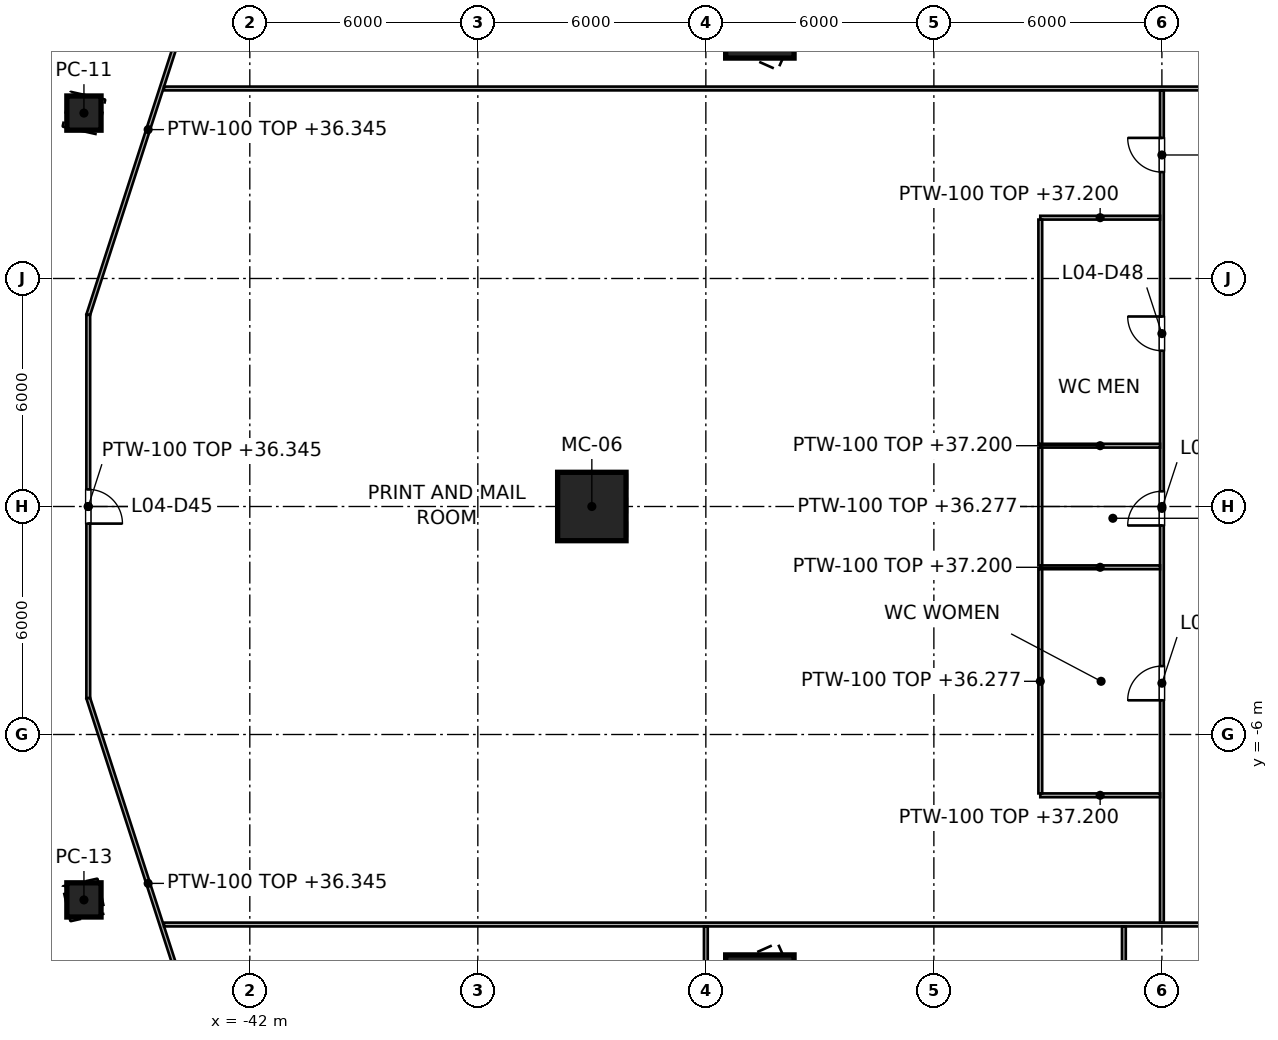
"""IFC4 building model, lengths in metres.
Left out: names, types, materials, properties, quantities, classifications, styles, units other than length and angle.
Written with IfcOpenShell. Run it as: python <this file> out.ifc"""

import sys

from ifc_helpers import new_model, si_unit, direction, frame, frame_2d, origin, origin_2d, place, context, subcontext, project, spatial, rectangle, hollow_rectangle, extrude, element, fill, save


model = new_model("IFC4")
c1 = context("Model", 3, precision=1e-05, world=origin(), true_north=direction((0.0, 1.0)))
c2 = subcontext(c1, "Body", "Model", "MODEL_VIEW")
j1 = project(units=[si_unit("LENGTHUNIT", "METRE"), si_unit("PLANEANGLEUNIT", "RADIAN")], contexts=[c1])
p1 = place(None, origin())
s1 = spatial("IfcSite", under=j1, at=p1, CompositionType="ELEMENT")
p2 = place(p1, origin())
s2 = spatial("IfcBuilding", under=s1, at=p2, CompositionType="ELEMENT")
p3 = place(p2, frame((0.0, 0.0, 31.4)))
s3 = spatial("IfcBuildingStorey", under=s2, at=p3, CompositionType="ELEMENT", Elevation=31.4)
for number, where, z_axis, x_axis in (
    (1, (-28.579, 12.7, 0.0), (0.0, 0.0, 1.0), (-0.914, 0.406, 0.0)),
    (2, (-33.0, 0.0, 0.0), (0.0, 0.0, 1.0), (-1.0, 0.0, 0.0)),
    (3, (-28.579, -12.7, 0.0), (0.0, 0.0, 1.0), (-0.914, -0.406, 0.0)),
):
    element("IfcColumn", number, at=place(p3, frame(where, z_axis=z_axis, x_axis=x_axis)), inside=s3, PredefinedType="COLUMN", context=c2, shape_type="SweptSolid", body=[
        extrude(hollow_rectangle(XDim=1.8, YDim=1.8, WallThickness=0.08, at=origin_2d()), origin(), (0.0, 0.0, 1.0), 6.0),
    ])
for number, where, z_axis, x_axis in (
    (4, (-46.365, 10.353, 0.0), (0.0, 0.0, 1.0), (-0.976, 0.218, 0.0)),
    (5, (-46.365, -10.353, 0.0), (0.0, 0.0, 1.0), (-0.976, -0.218, 0.0)),
):
    element("IfcColumn", number, at=place(p3, frame(where, z_axis=z_axis, x_axis=x_axis)), inside=s3, PredefinedType="COLUMN", context=c2, shape_type="SweptSolid", body=[
        extrude(hollow_rectangle(XDim=0.9, YDim=0.9, WallThickness=0.04, at=origin_2d()), origin(), (0.0, 0.0, 1.0), 6.0),
    ])
p4 = place(p3, frame((-43.099, 14.791, 0.0), z_axis=(0.0, 0.0, 1.0), x_axis=(-0.307713034182, -0.951479210805, 0.0)))
e6 = element("IfcWall", 6, at=p4, inside=s3, PredefinedType="PARTITIONING", context=c2, shape_type="SweptSolid", body=[
    extrude(rectangle(XDim=10.243, YDim=0.1, at=frame_2d((5.122, 0.0))), origin(), (0.0, 0.0, 1.0), 4.945),
])
p5 = place(p3, frame((-46.251, 5.045, 0.0), z_axis=(0.0, 0.0, 1.0), x_axis=(0.0, -1.0, 0.0)))
e7 = element("IfcWall", 7, at=p5, inside=s3, PredefinedType="PARTITIONING", context=c2, shape_type="SweptSolid", body=[
    extrude(rectangle(XDim=10.09, YDim=0.1, at=frame_2d((5.045, 0.0))), origin(), (0.0, 0.0, 1.0), 4.945),
])
p6 = place(p5, frame((4.595, 0.0, 0.0)))
e8 = element("IfcOpeningElement", 8, at=p6, cuts=e7, PredefinedType="OPENING", context=c2, shape_type="SweptSolid", body=[
    extrude(rectangle(XDim=0.9, YDim=2.1, at=frame_2d((0.45, 1.05))), frame((0.0, 0.05, 0.0), z_axis=(0.0, -1.0, 0.0), x_axis=(1.0, 0.0, 0.0)), (0.0, 0.0, 1.0), 0.1),
])
p7 = place(p3, frame((-46.251, -5.045, 0.0), z_axis=(0.0, 0.0, 1.0), x_axis=(0.307713034182, -0.951479210805, 0.0)))
e9 = element("IfcWall", 9, at=p7, inside=s3, PredefinedType="PARTITIONING", context=c2, shape_type="SweptSolid", body=[
    extrude(rectangle(XDim=10.243, YDim=0.1, at=frame_2d((5.122, 0.0))), origin(), (0.0, 0.0, 1.0), 4.945),
])
p8 = place(p3, frame((-44.256, 11.0, 0.0), z_axis=(0.0, 0.0, 1.0), x_axis=(1.0, 0.0, 0.0)))
e10 = element("IfcWall", 10, at=p8, inside=s3, PredefinedType="PARTITIONING", context=c2, shape_type="SweptSolid", body=[
    extrude(rectangle(XDim=88.512, YDim=0.1, at=frame_2d((44.256, 0.0))), origin(), (0.0, 0.0, 1.0), 4.868),
])
p9 = place(p8, frame((54.2, 0.0, 0.0)))
e11 = element("IfcOpeningElement", 11, at=p9, cuts=e10, PredefinedType="OPENING", context=c2, shape_type="SweptSolid", body=[
    extrude(rectangle(XDim=1.4, YDim=2.1, at=frame_2d((0.7, 1.05))), frame((0.0, 0.05, 0.0), z_axis=(0.0, -1.0, 0.0), x_axis=(1.0, 0.0, 0.0)), (0.0, 0.0, 1.0), 0.1),
])
p10 = place(p8, frame((32.9, 0.0, 0.0)))
e12 = element("IfcOpeningElement", 12, at=p10, cuts=e10, PredefinedType="OPENING", context=c2, shape_type="SweptSolid", body=[
    extrude(rectangle(XDim=1.4, YDim=2.1, at=frame_2d((0.7, 1.05))), frame((0.0, 0.05, 0.0), z_axis=(0.0, -1.0, 0.0), x_axis=(1.0, 0.0, 0.0)), (0.0, 0.0, 1.0), 0.1),
])
p11 = place(p8, frame((43.35, 0.0, 0.0)))
e13 = element("IfcOpeningElement", 13, at=p11, cuts=e10, PredefinedType="OPENING", context=c2, shape_type="SweptSolid", body=[
    extrude(rectangle(XDim=1.8, YDim=2.1, at=frame_2d((0.9, 1.05))), frame((0.0, 0.05, 0.0), z_axis=(0.0, -1.0, 0.0), x_axis=(1.0, 0.0, 0.0)), (0.0, 0.0, 1.0), 0.1),
])
p12 = place(p3, frame((-44.256, -11.0, 0.0), z_axis=(0.0, 0.0, 1.0), x_axis=(1.0, 0.0, 0.0)))
e14 = element("IfcWall", 14, at=p12, inside=s3, PredefinedType="PARTITIONING", context=c2, shape_type="SweptSolid", body=[
    extrude(rectangle(XDim=88.512, YDim=0.1, at=frame_2d((44.256, 0.0))), origin(), (0.0, 0.0, 1.0), 4.868),
])
p13 = place(p12, frame((32.9, 0.0, 0.0)))
e15 = element("IfcOpeningElement", 15, at=p13, cuts=e14, PredefinedType="OPENING", context=c2, shape_type="SweptSolid", body=[
    extrude(rectangle(XDim=1.4, YDim=2.1, at=frame_2d((0.7, 1.05))), frame((0.0, 0.05, 0.0), z_axis=(0.0, -1.0, 0.0), x_axis=(1.0, 0.0, 0.0)), (0.0, 0.0, 1.0), 0.1),
])
p14 = place(p12, frame((54.2, 0.0, 0.0)))
e16 = element("IfcOpeningElement", 16, at=p14, cuts=e14, PredefinedType="OPENING", context=c2, shape_type="SweptSolid", body=[
    extrude(rectangle(XDim=1.4, YDim=2.1, at=frame_2d((0.7, 1.05))), frame((0.0, 0.05, 0.0), z_axis=(0.0, -1.0, 0.0), x_axis=(1.0, 0.0, 0.0)), (0.0, 0.0, 1.0), 0.1),
])
p15 = place(p12, frame((38.65, 0.0, 0.0)))
e17 = element("IfcOpeningElement", 17, at=p15, cuts=e14, PredefinedType="OPENING", context=c2, shape_type="SweptSolid", body=[
    extrude(rectangle(XDim=1.8, YDim=2.1, at=frame_2d((0.9, 1.05))), frame((0.0, 0.05, 0.0), z_axis=(0.0, -1.0, 0.0), x_axis=(1.0, 0.0, 0.0)), (0.0, 0.0, 1.0), 0.1),
])
p16 = place(p12, frame((48.1, 0.0, 0.0)))
e18 = element("IfcOpeningElement", 18, at=p16, cuts=e14, PredefinedType="OPENING", context=c2, shape_type="SweptSolid", body=[
    extrude(rectangle(XDim=1.8, YDim=2.1, at=frame_2d((0.9, 1.05))), frame((0.0, 0.05, 0.0), z_axis=(0.0, -1.0, 0.0), x_axis=(1.0, 0.0, 0.0)), (0.0, 0.0, 1.0), 0.1),
])
p17 = place(p3, frame((-18.0, -10.95, 0.0), z_axis=(0.0, 0.0, 1.0), x_axis=(0.0, 1.0, 0.0)))
e19 = element("IfcWall", 19, at=p17, inside=s3, PredefinedType="PARTITIONING", context=c2, shape_type="SweptSolid", body=[
    extrude(rectangle(XDim=21.9, YDim=0.1, at=frame_2d((10.95, 0.0))), origin(), (0.0, 0.0, 1.0), 4.877),
])
p18 = place(p17, frame((19.75, 0.0, 0.0)))
e20 = element("IfcOpeningElement", 20, at=p18, cuts=e19, PredefinedType="OPENING", context=c2, shape_type="SweptSolid", body=[
    extrude(rectangle(XDim=0.9, YDim=2.1, at=frame_2d((0.45, 1.05))), frame((0.0, 0.05, 0.0), z_axis=(0.0, -1.0, 0.0), x_axis=(1.0, 0.0, 0.0)), (0.0, 0.0, 1.0), 0.1),
])
p19 = place(p17, frame((5.85, 0.0, 0.0)))
e21 = element("IfcOpeningElement", 21, at=p19, cuts=e19, PredefinedType="OPENING", context=c2, shape_type="SweptSolid", body=[
    extrude(rectangle(XDim=0.9, YDim=2.1, at=frame_2d((0.45, 1.05))), frame((0.0, 0.05, 0.0), z_axis=(0.0, -1.0, 0.0), x_axis=(1.0, 0.0, 0.0)), (0.0, 0.0, 1.0), 0.1),
])
p20 = place(p17, frame((10.45, 0.0, 0.0)))
e22 = element("IfcOpeningElement", 22, at=p20, cuts=e19, PredefinedType="OPENING", context=c2, shape_type="SweptSolid", body=[
    extrude(rectangle(XDim=0.9, YDim=2.1, at=frame_2d((0.45, 1.05))), frame((0.0, 0.05, 0.0), z_axis=(0.0, -1.0, 0.0), x_axis=(1.0, 0.0, 0.0)), (0.0, 0.0, 1.0), 0.1),
])
p21 = place(p17, frame((15.05, 0.0, 0.0)))
e23 = element("IfcOpeningElement", 23, at=p21, cuts=e19, PredefinedType="OPENING", context=c2, shape_type="SweptSolid", body=[
    extrude(rectangle(XDim=0.9, YDim=2.1, at=frame_2d((0.45, 1.05))), frame((0.0, 0.05, 0.0), z_axis=(0.0, -1.0, 0.0), x_axis=(1.0, 0.0, 0.0)), (0.0, 0.0, 1.0), 0.1),
])
p22 = place(p3, frame((-30.0, -11.05, 0.0), z_axis=(0.0, 0.0, 1.0), x_axis=(0.0, -1.0, 0.0)))
e24 = element("IfcWall", 24, at=p22, inside=s3, PredefinedType="PARTITIONING", context=c2, shape_type="SweptSolid", body=[
    extrude(rectangle(XDim=18.18, YDim=0.1, at=frame_2d((9.09, 0.0))), origin(), (0.0, 0.0, 1.0), 4.945),
])
p23 = place(p3, frame((-19.0, -11.05, 0.0), z_axis=(0.0, 0.0, 1.0), x_axis=(0.0, -1.0, 0.0)))
e25 = element("IfcWall", 25, at=p23, inside=s3, PredefinedType="PARTITIONING", context=c2, shape_type="SweptSolid", body=[
    extrude(rectangle(XDim=24.03, YDim=0.1, at=frame_2d((12.015, 0.0))), origin(), (0.0, 0.0, 1.0), 4.868),
])
for number, where, z_axis, x_axis in (
    (26, (-21.2, -7.6, 0.0), (0.0, 0.0, 1.0), (1.0, 0.0, 0.0)),
    (27, (-18.05, -1.6, 0.0), (0.0, 0.0, 1.0), (-1.0, 0.0, 0.0)),
):
    element("IfcWall", number, at=place(p3, frame(where, z_axis=z_axis, x_axis=x_axis)), inside=s3, PredefinedType="PARTITIONING", context=c2, shape_type="SweptSolid", body=[
        extrude(rectangle(XDim=3.15, YDim=0.1, at=frame_2d((1.575, 0.0))), origin(), (0.0, 0.0, 1.0), 5.8),
    ])
p24 = place(p3, frame((-21.2, -1.65, 0.0), z_axis=(0.0, 0.0, 1.0), x_axis=(0.0, -1.0, 0.0)))
e28 = element("IfcWall", 28, at=p24, inside=s3, PredefinedType="PARTITIONING", context=c2, shape_type="SweptSolid", body=[
    extrude(rectangle(XDim=5.9, YDim=0.1, at=frame_2d((2.95, 0.0))), origin(), (0.0, 0.0, 1.0), 4.877),
])
p25 = place(p3, frame((-18.05, 1.6, 0.0), z_axis=(0.0, 0.0, 1.0), x_axis=(-1.0, 0.0, 0.0)))
e29 = element("IfcWall", 29, at=p25, inside=s3, PredefinedType="PARTITIONING", context=c2, shape_type="SweptSolid", body=[
    extrude(rectangle(XDim=3.15, YDim=0.1, at=frame_2d((1.575, 0.0))), origin(), (0.0, 0.0, 1.0), 5.8),
])
p26 = place(p3, frame((-21.2, 1.55, 0.0), z_axis=(0.0, 0.0, 1.0), x_axis=(0.0, -1.0, 0.0)))
e30 = element("IfcWall", 30, at=p26, inside=s3, PredefinedType="PARTITIONING", context=c2, shape_type="SweptSolid", body=[
    extrude(rectangle(XDim=3.1, YDim=0.1, at=frame_2d((1.55, 0.0))), origin(), (0.0, 0.0, 1.0), 4.877),
])
p27 = place(p3, frame((-18.05, 7.6, 0.0), z_axis=(0.0, 0.0, 1.0), x_axis=(-1.0, 0.0, 0.0)))
e31 = element("IfcWall", 31, at=p27, inside=s3, PredefinedType="PARTITIONING", context=c2, shape_type="SweptSolid", body=[
    extrude(rectangle(XDim=3.15, YDim=0.1, at=frame_2d((1.575, 0.0))), origin(), (0.0, 0.0, 1.0), 5.8),
])
p28 = place(p3, frame((-21.2, 7.55, 0.0), z_axis=(0.0, 0.0, 1.0), x_axis=(0.0, -1.0, 0.0)))
e32 = element("IfcWall", 32, at=p28, inside=s3, PredefinedType="PARTITIONING", context=c2, shape_type="SweptSolid", body=[
    extrude(rectangle(XDim=5.9, YDim=0.1, at=frame_2d((2.95, 0.0))), origin(), (0.0, 0.0, 1.0), 4.877),
])
p29 = place(p18, origin())
e33 = element("IfcDoor", 33, at=p29, inside=s3, OperationType="SINGLE_SWING_RIGHT", PredefinedType="DOOR", context=c2, shape_type="SweptSolid", body=[
    extrude(rectangle(XDim=0.9, YDim=2.1, at=frame_2d((0.45, 1.05))), frame((0.0, 0.025, 0.0), z_axis=(0.0, -1.0, 0.0), x_axis=(1.0, 0.0, 0.0)), (0.0, 0.0, 1.0), 0.05),
])
fill(e20, e33)
p30 = place(p6, origin())
e34 = element("IfcDoor", 34, at=p30, inside=s3, OperationType="SINGLE_SWING_RIGHT", PredefinedType="DOOR", context=c2, shape_type="SweptSolid", body=[
    extrude(rectangle(XDim=0.9, YDim=2.1, at=frame_2d((0.45, 1.05))), frame((0.0, 0.025, 0.0), z_axis=(0.0, -1.0, 0.0), x_axis=(1.0, 0.0, 0.0)), (0.0, 0.0, 1.0), 0.05),
])
fill(e8, e34)
p31 = place(p19, origin())
e35 = element("IfcDoor", 35, at=p31, inside=s3, OperationType="SINGLE_SWING_LEFT", PredefinedType="DOOR", context=c2, shape_type="SweptSolid", body=[
    extrude(rectangle(XDim=0.9, YDim=2.1, at=frame_2d((0.45, 1.05))), frame((0.0, 0.025, 0.0), z_axis=(0.0, -1.0, 0.0), x_axis=(1.0, 0.0, 0.0)), (0.0, 0.0, 1.0), 0.05),
])
fill(e21, e35)
p32 = place(p20, origin())
e36 = element("IfcDoor", 36, at=p32, inside=s3, OperationType="SINGLE_SWING_LEFT", PredefinedType="DOOR", context=c2, shape_type="SweptSolid", body=[
    extrude(rectangle(XDim=0.9, YDim=2.1, at=frame_2d((0.45, 1.05))), frame((0.0, 0.025, 0.0), z_axis=(0.0, -1.0, 0.0), x_axis=(1.0, 0.0, 0.0)), (0.0, 0.0, 1.0), 0.05),
])
fill(e22, e36)
p33 = place(p21, origin())
e37 = element("IfcDoor", 37, at=p33, inside=s3, OperationType="SINGLE_SWING_RIGHT", PredefinedType="DOOR", context=c2, shape_type="SweptSolid", body=[
    extrude(rectangle(XDim=0.9, YDim=2.1, at=frame_2d((0.45, 1.05))), frame((0.0, 0.025, 0.0), z_axis=(0.0, -1.0, 0.0), x_axis=(1.0, 0.0, 0.0)), (0.0, 0.0, 1.0), 0.05),
])
fill(e23, e37)
save(model, sys.argv[1])
